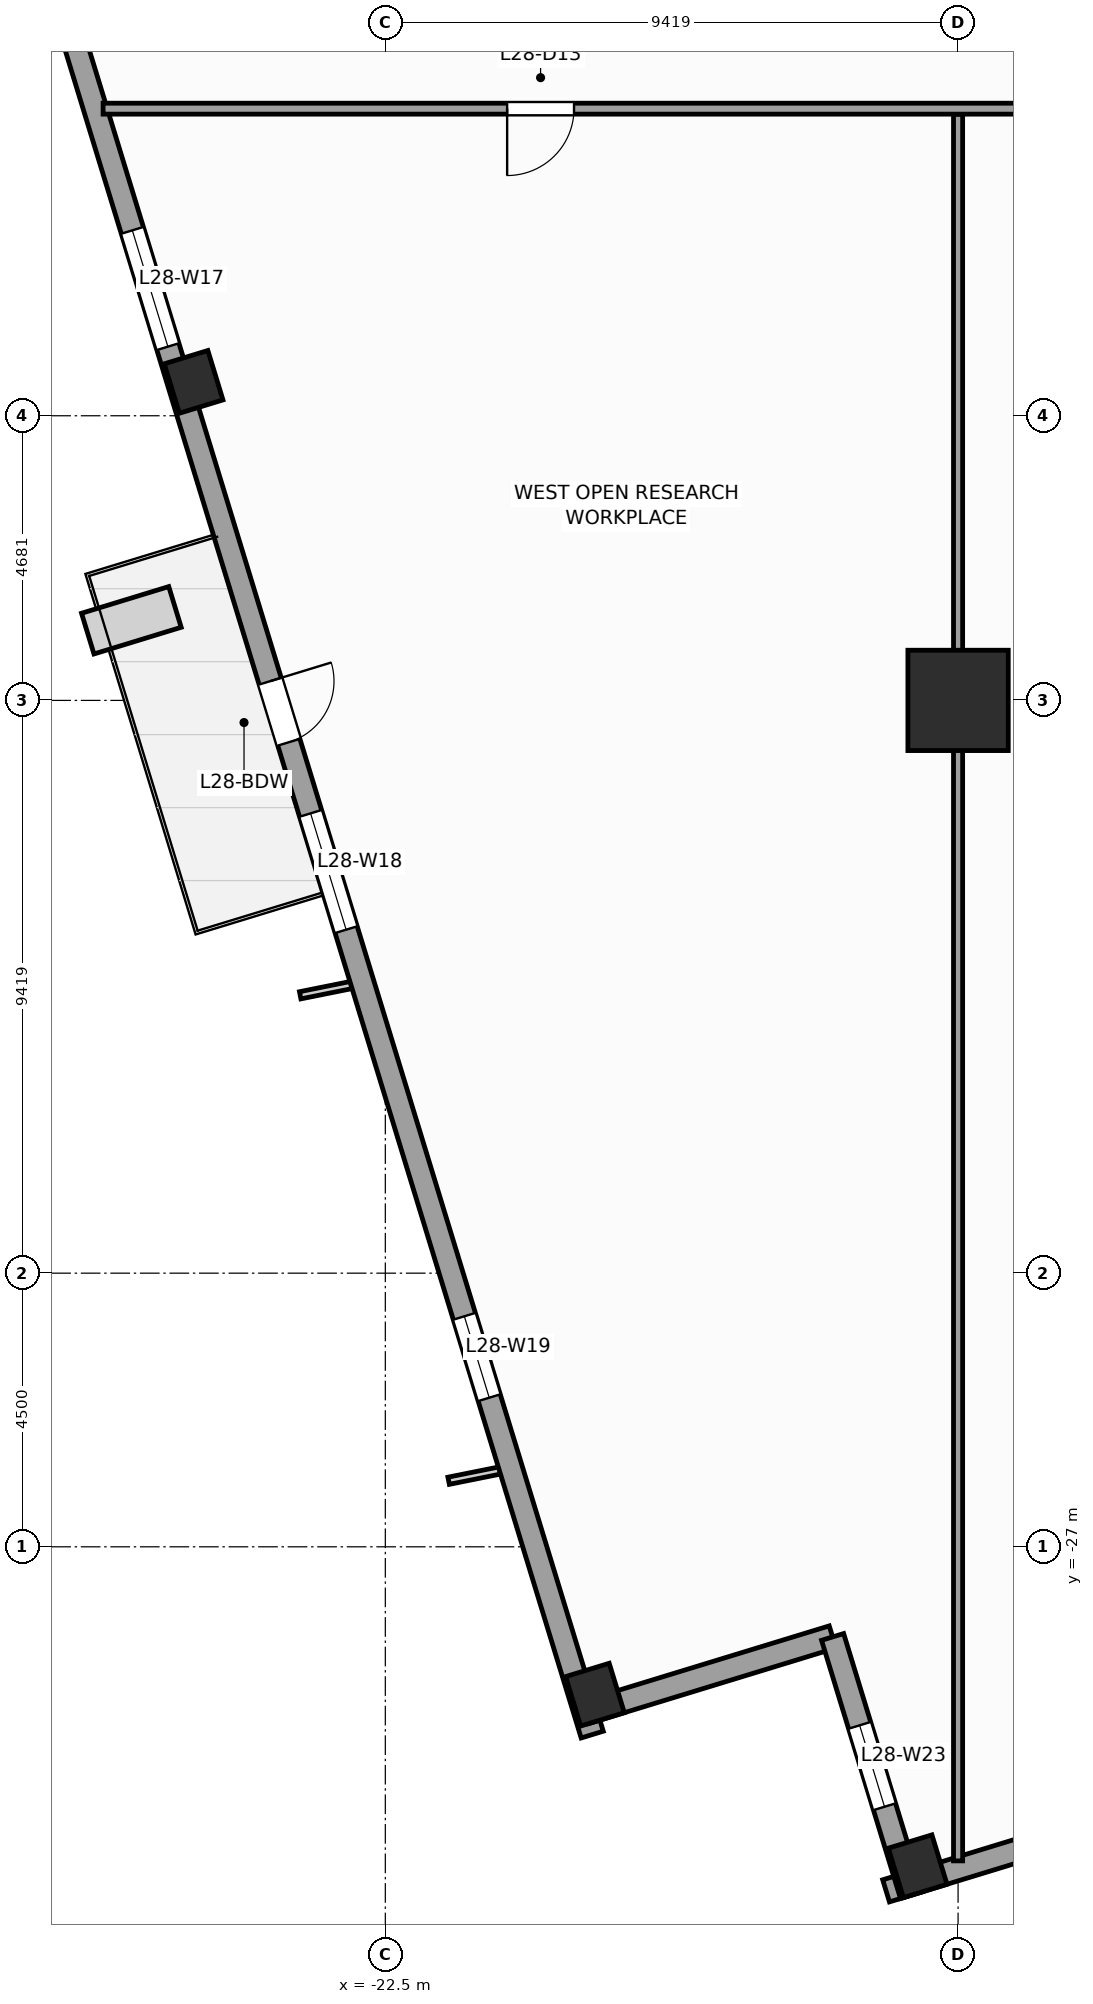
"""IFC4 building model, lengths in metres.
Left out: names, types, materials, properties, quantities, classifications, styles, units other than length and angle.
Written with IfcOpenShell. Run it as: python <this file> out.ifc"""

import sys

from ifc_helpers import new_model, si_unit, direction, frame, frame_2d, origin, origin_2d, place, context, subcontext, project, spatial, rectangle, extrude, source, transform, mapped, element, fill, save


model = new_model("IFC4")
c1 = context("Model", 3, precision=1e-05, world=origin(), true_north=direction((0.0, 1.0)))
c2 = subcontext(c1, "Body", "Model", "MODEL_VIEW")
j1 = project(units=[si_unit("LENGTHUNIT", "METRE"), si_unit("PLANEANGLEUNIT", "RADIAN")], contexts=[c1])
p1 = place(None, origin())
s1 = spatial("IfcSite", under=j1, at=p1, CompositionType="ELEMENT")
p2 = place(p1, origin())
s2 = spatial("IfcBuilding", under=s1, at=p2, CompositionType="ELEMENT")
p3 = place(p2, frame((0.0, 0.0, 119.2)))
s3 = spatial("IfcBuildingStorey", under=s2, at=p3, CompositionType="ELEMENT", Elevation=119.2)
m1 = source(origin(), c2, "Body", "SweptSolid", [
    extrude(rectangle(XDim=1.65, YDim=1.65, at=origin_2d()), origin(), (0.0, 0.0, 1.0), 4.0),
])
p4 = place(p3, frame((-13.081, -13.081, 0.0), z_axis=(0.0, 0.0, 1.0), x_axis=(1.0, 0.0, 0.0)))
e1 = element("IfcColumn", 1, at=p4, inside=s3, PredefinedType="COLUMN", context=c2, shape_type="MappedRepresentation", body=[
    mapped(m1, transform((0.0, 0.0, 0.0), scale=1.0)),
])
m2 = source(origin(), c2, "Body", "SweptSolid", [
    extrude(rectangle(XDim=0.75, YDim=0.85, at=origin_2d()), origin(), (0.0, 0.0, 1.0), 4.0),
])
for number, where, z_axis, x_axis in (
    (2, (-13.746, -32.253, 0.0), (0.0, 0.0, 1.0), (0.956, 0.292, 0.0)),
    (3, (-25.653, -7.843, 0.0), (0.0, 0.0, 1.0), (0.956, 0.292, 0.0)),
    (4, (-19.052, -29.431, 0.0), (0.0, 0.0, 1.0), (0.956, 0.292, 0.0)),
):
    element("IfcColumn", number, at=place(p3, frame(where, z_axis=z_axis, x_axis=x_axis)), inside=s3, PredefinedType="COLUMN", context=c2, shape_type="MappedRepresentation", body=[
        mapped(m2, transform((0.0, 0.0, 0.0), scale=1.0)),
    ])
p5 = place(p3, frame((-14.265, -32.658, 0.0), z_axis=(0.0, 0.0, 1.0), x_axis=(0.956304320851, 0.292373127906, 0.0)))
e5 = element("IfcWall", 5, at=p5, inside=s3, PredefinedType="STANDARD", context=c2, shape_type="SweptSolid", body=[
    extrude(rectangle(XDim=46.38, YDim=0.38, at=frame_2d((23.19, 0.0))), origin(), (0.0, 0.0, 1.0), 3.14),
])
p6 = place(p5, frame((4.865, 0.0, 0.51)))
e6 = element("IfcOpeningElement", 6, at=p6, cuts=e5, PredefinedType="OPENING", context=c2, shape_type="SweptSolid", body=[
    extrude(rectangle(XDim=1.4, YDim=2.4, at=frame_2d((0.7, 1.2))), frame((0.0, 0.2, 0.0), z_axis=(0.0, -1.0, 0.0), x_axis=(1.0, 0.0, 0.0)), (0.0, 0.0, 1.0), 0.4),
])
p7 = place(p5, frame((10.95, 0.0, 0.51)))
e7 = element("IfcOpeningElement", 7, at=p7, cuts=e5, PredefinedType="OPENING", context=c2, shape_type="SweptSolid", body=[
    extrude(rectangle(XDim=2.0, YDim=2.4, at=frame_2d((1.0, 1.2))), frame((0.0, 0.2, 0.0), z_axis=(0.0, -1.0, 0.0), x_axis=(1.0, 0.0, 0.0)), (0.0, 0.0, 1.0), 0.4),
])
p8 = place(p5, frame((20.512, 0.0, 0.51)))
e8 = element("IfcOpeningElement", 8, at=p8, cuts=e5, PredefinedType="OPENING", context=c2, shape_type="SweptSolid", body=[
    extrude(rectangle(XDim=2.0, YDim=2.4, at=frame_2d((1.0, 1.2))), frame((0.0, 0.2, 0.0), z_axis=(0.0, -1.0, 0.0), x_axis=(1.0, 0.0, 0.0)), (0.0, 0.0, 1.0), 0.4),
])
p9 = place(p5, frame((30.538, 0.0, 0.51)))
e9 = element("IfcOpeningElement", 9, at=p9, cuts=e5, PredefinedType="OPENING", context=c2, shape_type="SweptSolid", body=[
    extrude(rectangle(XDim=2.0, YDim=2.4, at=frame_2d((1.0, 1.2))), frame((0.0, 0.2, 0.0), z_axis=(0.0, -1.0, 0.0), x_axis=(1.0, 0.0, 0.0)), (0.0, 0.0, 1.0), 0.4),
])
p10 = place(p5, frame((39.187, 0.0, 0.51)))
e10 = element("IfcOpeningElement", 10, at=p10, cuts=e5, PredefinedType="OPENING", context=c2, shape_type="SweptSolid", body=[
    extrude(rectangle(XDim=1.4, YDim=2.4, at=frame_2d((0.7, 1.2))), frame((0.0, 0.2, 0.0), z_axis=(0.0, -1.0, 0.0), x_axis=(1.0, 0.0, 0.0)), (0.0, 0.0, 1.0), 0.4),
])
p11 = place(p3, frame((-32.658, 14.265, 0.0), z_axis=(0.0, 0.0, 1.0), x_axis=(0.292373127906, -0.956304320851, 0.0)))
e11 = element("IfcWall", 11, at=p11, inside=s3, PredefinedType="STANDARD", context=c2, shape_type="SweptSolid", body=[
    extrude(rectangle(XDim=46.38, YDim=0.38, at=frame_2d((23.19, 0.0))), origin(), (0.0, 0.0, 1.0), 3.14),
])
p12 = place(p11, frame((28.265, 0.0, 0.0)))
e12 = element("IfcOpeningElement", 12, at=p12, cuts=e11, PredefinedType="OPENING", context=c2, shape_type="SweptSolid", body=[
    extrude(rectangle(XDim=1.05, YDim=2.25, at=frame_2d((0.525, 1.125))), frame((0.0, 0.2, 0.0), z_axis=(0.0, -1.0, 0.0), x_axis=(1.0, 0.0, 0.0)), (0.0, 0.0, 1.0), 0.4),
])
p13 = place(p11, frame((4.865, 0.0, 0.51)))
e13 = element("IfcOpeningElement", 13, at=p13, cuts=e11, PredefinedType="OPENING", context=c2, shape_type="SweptSolid", body=[
    extrude(rectangle(XDim=1.4, YDim=2.4, at=frame_2d((0.7, 1.2))), frame((0.0, 0.2, 0.0), z_axis=(0.0, -1.0, 0.0), x_axis=(1.0, 0.0, 0.0)), (0.0, 0.0, 1.0), 0.4),
])
p14 = place(p11, frame((12.45, 0.0, 0.51)))
e14 = element("IfcOpeningElement", 14, at=p14, cuts=e11, PredefinedType="OPENING", context=c2, shape_type="SweptSolid", body=[
    extrude(rectangle(XDim=2.0, YDim=2.4, at=frame_2d((1.0, 1.2))), frame((0.0, 0.2, 0.0), z_axis=(0.0, -1.0, 0.0), x_axis=(1.0, 0.0, 0.0)), (0.0, 0.0, 1.0), 0.4),
])
p15 = place(p11, frame((20.512, 0.0, 0.51)))
e15 = element("IfcOpeningElement", 15, at=p15, cuts=e11, PredefinedType="OPENING", context=c2, shape_type="SweptSolid", body=[
    extrude(rectangle(XDim=2.0, YDim=2.4, at=frame_2d((1.0, 1.2))), frame((0.0, 0.2, 0.0), z_axis=(0.0, -1.0, 0.0), x_axis=(1.0, 0.0, 0.0)), (0.0, 0.0, 1.0), 0.4),
])
p16 = place(p11, frame((30.538, 0.0, 0.51)))
e16 = element("IfcOpeningElement", 16, at=p16, cuts=e11, PredefinedType="OPENING", context=c2, shape_type="SweptSolid", body=[
    extrude(rectangle(XDim=2.0, YDim=2.4, at=frame_2d((1.0, 1.2))), frame((0.0, 0.2, 0.0), z_axis=(0.0, -1.0, 0.0), x_axis=(1.0, 0.0, 0.0)), (0.0, 0.0, 1.0), 0.4),
])
p17 = place(p11, frame((39.187, 0.0, 0.51)))
e17 = element("IfcOpeningElement", 17, at=p17, cuts=e11, PredefinedType="OPENING", context=c2, shape_type="SweptSolid", body=[
    extrude(rectangle(XDim=1.4, YDim=2.4, at=frame_2d((0.7, 1.2))), frame((0.0, 0.2, 0.0), z_axis=(0.0, -1.0, 0.0), x_axis=(1.0, 0.0, 0.0)), (0.0, 0.0, 1.0), 0.4),
])
p18 = place(p3, frame((-19.208, -29.725, 0.0), z_axis=(0.0, 0.0, 1.0), x_axis=(0.956312764915, 0.292345507338, 0.0)))
e18 = element("IfcWall", 18, at=p18, inside=s3, PredefinedType="STANDARD", context=c2, shape_type="SweptSolid", body=[
    extrude(rectangle(XDim=4.25, YDim=0.38, at=frame_2d((2.125, 0.0))), origin(), (0.0, 0.0, 1.0), 3.74),
])
p19 = place(p3, frame((-15.144, -28.482, 0.0), z_axis=(0.0, 0.0, 1.0), x_axis=(0.292373601522, -0.956304176051, 0.0)))
e19 = element("IfcWall", 19, at=p19, inside=s3, PredefinedType="STANDARD", context=c2, shape_type="SweptSolid", body=[
    extrude(rectangle(XDim=4.44, YDim=0.38, at=frame_2d((2.22, 0.0))), origin(), (0.0, 0.0, 1.0), 3.04),
])
p20 = place(p19, frame((1.52, 0.0, 0.51)))
e20 = element("IfcOpeningElement", 20, at=p20, cuts=e19, PredefinedType="OPENING", context=c2, shape_type="SweptSolid", body=[
    extrude(rectangle(XDim=1.4, YDim=2.4, at=frame_2d((0.7, 1.2))), frame((0.0, 0.2, 0.0), z_axis=(0.0, -1.0, 0.0), x_axis=(1.0, 0.0, 0.0)), (0.0, 0.0, 1.0), 0.4),
])
p21 = place(p3, frame((-27.142, -3.35, 0.0), z_axis=(0.0, 0.0, 1.0), x_axis=(1.0, 0.0, 0.0)))
e21 = element("IfcWall", 21, at=p21, inside=s3, PredefinedType="PARTITIONING", context=c2, shape_type="SweptSolid", body=[
    extrude(rectangle(XDim=16.592, YDim=0.18, at=frame_2d((8.296, 0.0))), origin(), (0.0, 0.0, 1.0), 3.74),
])
p22 = place(p21, frame((6.645, 0.0, 0.0)))
e22 = element("IfcOpeningElement", 22, at=p22, cuts=e21, PredefinedType="OPENING", context=c2, shape_type="SweptSolid", body=[
    extrude(rectangle(XDim=1.1, YDim=2.2, at=frame_2d((0.55, 1.1))), frame((0.0, 0.1, 0.0), z_axis=(0.0, -1.0, 0.0), x_axis=(1.0, 0.0, 0.0)), (0.0, 0.0, 1.0), 0.2),
])
p23 = place(p3, frame((-13.081, -32.165, 0.0), z_axis=(0.0, 0.0, 1.0), x_axis=(0.0, 1.0, 0.0)))
e23 = element("IfcWall", 23, at=p23, inside=s3, PredefinedType="PARTITIONING", context=c2, shape_type="SweptSolid", body=[
    extrude(rectangle(XDim=28.72, YDim=0.15, at=frame_2d((14.36, 0.0))), origin(), (0.0, 0.0, 1.0), 2.732),
])
m3 = source(origin(), c2, "Body", "SweptSolid", [
    extrude(rectangle(XDim=1.05, YDim=2.25, at=frame_2d((0.525, 1.125))), frame((0.0, 0.025, 0.0), z_axis=(0.0, -1.0, 0.0), x_axis=(1.0, 0.0, 0.0)), (0.0, 0.0, 1.0), 0.05),
])
p24 = place(p12, origin())
e24 = element("IfcDoor", 24, at=p24, inside=s3, OperationType="SINGLE_SWING_LEFT", PredefinedType="DOOR", context=c2, shape_type="MappedRepresentation", body=[
    mapped(m3, transform((0.0, 0.0, 0.0), scale=1.0)),
])
fill(e12, e24)
m4 = source(origin(), c2, "Body", "SweptSolid", [
    extrude(rectangle(XDim=2.0, YDim=2.4, at=frame_2d((1.0, 1.2))), frame((0.0, 0.03, 0.0), z_axis=(0.0, -1.0, 0.0), x_axis=(1.0, 0.0, 0.0)), (0.0, 0.0, 1.0), 0.06),
])
p25 = place(p15, origin())
e25 = element("IfcWindow", 25, at=p25, inside=s3, PartitioningType="SINGLE_PANEL", PredefinedType="WINDOW", context=c2, shape_type="MappedRepresentation", body=[
    mapped(m4, transform((0.0, 0.0, 0.0), scale=1.0)),
])
fill(e15, e25)
p26 = place(p16, origin())
e26 = element("IfcWindow", 26, at=p26, inside=s3, PartitioningType="SINGLE_PANEL", PredefinedType="WINDOW", context=c2, shape_type="MappedRepresentation", body=[
    mapped(m4, transform((0.0, 0.0, 0.0), scale=1.0)),
])
fill(e16, e26)
m5 = source(origin(), c2, "Body", "SweptSolid", [
    extrude(rectangle(XDim=1.4, YDim=2.4, at=frame_2d((0.7, 1.2))), frame((0.0, 0.03, 0.0), z_axis=(0.0, -1.0, 0.0), x_axis=(1.0, 0.0, 0.0)), (0.0, 0.0, 1.0), 0.06),
])
p27 = place(p17, origin())
e27 = element("IfcWindow", 27, at=p27, inside=s3, PartitioningType="SINGLE_PANEL", PredefinedType="WINDOW", context=c2, shape_type="MappedRepresentation", body=[
    mapped(m5, transform((0.0, 0.0, 0.0), scale=1.0)),
])
fill(e17, e27)
p28 = place(p20, origin())
e28 = element("IfcWindow", 28, at=p28, inside=s3, PartitioningType="SINGLE_PANEL", PredefinedType="WINDOW", context=c2, shape_type="MappedRepresentation", body=[
    mapped(m5, transform((0.0, 0.0, 0.0), scale=1.0)),
])
fill(e20, e28)
m6 = source(origin(), c2, "Body", "SweptSolid", [
    extrude(rectangle(XDim=1.1, YDim=2.2, at=frame_2d((0.55, 1.1))), frame((0.0, 0.025, 0.0), z_axis=(0.0, -1.0, 0.0), x_axis=(1.0, 0.0, 0.0)), (0.0, 0.0, 1.0), 0.05),
])
p29 = place(p22, frame((1.1, 0.0, 0.0), z_axis=(0.0, 0.0, 1.0), x_axis=(-1.0, 0.0, 0.0)))
e29 = element("IfcDoor", 29, at=p29, inside=s3, OperationType="SINGLE_SWING_LEFT", PredefinedType="DOOR", context=c2, shape_type="MappedRepresentation", body=[
    mapped(m6, transform((0.0, 0.0, 0.0), scale=1.0)),
])
fill(e22, e29)
save(model, sys.argv[1])
